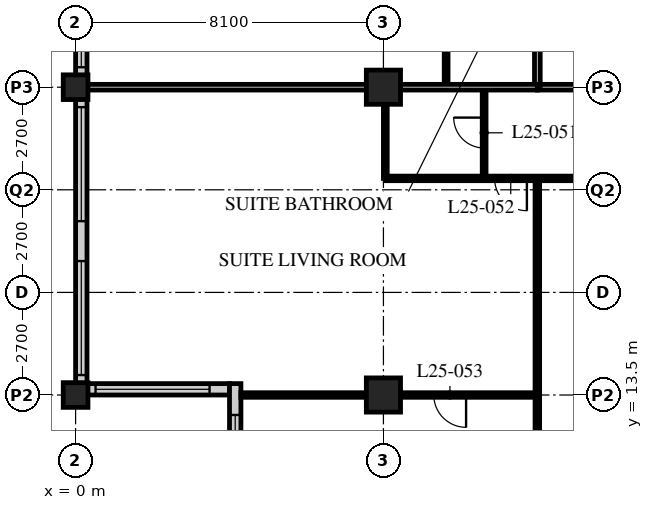
"""IFC4 building model, lengths in metres.
Left out: names, types, materials, properties, quantities, classifications, styles, units other than length and angle.
Written with IfcOpenShell. Run it as: python <this file> out.ifc"""

import sys

from ifc_helpers import new_model, si_unit, direction, frame, frame_2d, origin, origin_2d, place, context, subcontext, project, spatial, rectangle, hollow_rectangle, extrude, element, fill, save


model = new_model("IFC4")
c1 = context("Model", 3, precision=1e-05, world=origin(), true_north=direction((0.0, 1.0)))
c2 = subcontext(c1, "Body", "Model", "MODEL_VIEW")
j1 = project(units=[si_unit("LENGTHUNIT", "METRE"), si_unit("PLANEANGLEUNIT", "RADIAN")], contexts=[c1])
p1 = place(None, origin())
s1 = spatial("IfcSite", under=j1, at=p1, CompositionType="ELEMENT")
p2 = place(p1, origin())
s2 = spatial("IfcBuilding", under=s1, at=p2, CompositionType="ELEMENT")
p3 = place(p2, frame((0.0, 0.0, 103.4)))
s3 = spatial("IfcBuildingStorey", under=s2, at=p3, CompositionType="ELEMENT", Elevation=103.4)
for number, where, z_axis, x_axis in (
    (1, (0.0, 13.5, 0.0), (0.0, 0.0, 1.0), (1.0, 0.0, 0.0)),
    (2, (0.0, 21.6, 0.0), (0.0, 0.0, 1.0), (1.0, 0.0, 0.0)),
):
    element("IfcColumn", number, at=place(p3, frame(where, z_axis=z_axis, x_axis=x_axis)), inside=s3, PredefinedType="COLUMN", context=c2, shape_type="SweptSolid", body=[
        extrude(hollow_rectangle(XDim=0.65, YDim=0.65, WallThickness=0.055, at=origin_2d()), origin(), (0.0, 0.0, 1.0), 3.4),
    ])
for number, where, z_axis, x_axis in (
    (3, (8.1, 13.5, 0.0), (0.0, 0.0, 1.0), (1.0, 0.0, 0.0)),
    (4, (8.1, 21.6, 0.0), (0.0, 0.0, 1.0), (1.0, 0.0, 0.0)),
):
    element("IfcColumn", number, at=place(p3, frame(where, z_axis=z_axis, x_axis=x_axis)), inside=s3, PredefinedType="COLUMN", context=c2, shape_type="SweptSolid", body=[
        extrude(hollow_rectangle(XDim=0.9, YDim=0.9, WallThickness=0.1, at=origin_2d()), origin(), (0.0, 0.0, 1.0), 3.4),
    ])
p4 = place(p3, frame((0.15, 45.6, 0.0), z_axis=(0.0, 0.0, 1.0), x_axis=(0.0, -1.0, 0.0)))
e5 = element("IfcWall", 5, at=p4, inside=s3, PredefinedType="SOLIDWALL", context=c2, shape_type="SweptSolid", body=[
    extrude(rectangle(XDim=32.1, YDim=0.3, at=frame_2d((16.05, 0.0))), origin(), (0.0, 0.0, 1.0), 3.19),
])
p5 = place(p4, frame((0.225, 0.0, 0.9)))
e6 = element("IfcOpeningElement", 6, at=p5, cuts=e5, PredefinedType="OPENING", context=c2, shape_type="SweptSolid", body=[
    extrude(rectangle(XDim=3.0, YDim=2.0, at=frame_2d((1.5, 1.0))), frame((0.0, 0.16, 0.0), z_axis=(0.0, -1.0, 0.0), x_axis=(1.0, 0.0, 0.0)), (0.0, 0.0, 1.0), 0.32),
])
p6 = place(p4, frame((4.275, 0.0, 0.9)))
e7 = element("IfcOpeningElement", 7, at=p6, cuts=e5, PredefinedType="OPENING", context=c2, shape_type="SweptSolid", body=[
    extrude(rectangle(XDim=3.0, YDim=2.0, at=frame_2d((1.5, 1.0))), frame((0.0, 0.16, 0.0), z_axis=(0.0, -1.0, 0.0), x_axis=(1.0, 0.0, 0.0)), (0.0, 0.0, 1.0), 0.32),
])
p7 = place(p4, frame((8.325, 0.0, 0.9)))
e8 = element("IfcOpeningElement", 8, at=p7, cuts=e5, PredefinedType="OPENING", context=c2, shape_type="SweptSolid", body=[
    extrude(rectangle(XDim=3.0, YDim=2.0, at=frame_2d((1.5, 1.0))), frame((0.0, 0.16, 0.0), z_axis=(0.0, -1.0, 0.0), x_axis=(1.0, 0.0, 0.0)), (0.0, 0.0, 1.0), 0.32),
])
p8 = place(p4, frame((12.375, 0.0, 0.9)))
e9 = element("IfcOpeningElement", 9, at=p8, cuts=e5, PredefinedType="OPENING", context=c2, shape_type="SweptSolid", body=[
    extrude(rectangle(XDim=3.0, YDim=2.0, at=frame_2d((1.5, 1.0))), frame((0.0, 0.16, 0.0), z_axis=(0.0, -1.0, 0.0), x_axis=(1.0, 0.0, 0.0)), (0.0, 0.0, 1.0), 0.32),
])
p9 = place(p4, frame((16.425, 0.0, 0.9)))
e10 = element("IfcOpeningElement", 10, at=p9, cuts=e5, PredefinedType="OPENING", context=c2, shape_type="SweptSolid", body=[
    extrude(rectangle(XDim=3.0, YDim=2.0, at=frame_2d((1.5, 1.0))), frame((0.0, 0.16, 0.0), z_axis=(0.0, -1.0, 0.0), x_axis=(1.0, 0.0, 0.0)), (0.0, 0.0, 1.0), 0.32),
])
p10 = place(p4, frame((20.475, 0.0, 0.9)))
e11 = element("IfcOpeningElement", 11, at=p10, cuts=e5, PredefinedType="OPENING", context=c2, shape_type="SweptSolid", body=[
    extrude(rectangle(XDim=3.0, YDim=2.0, at=frame_2d((1.5, 1.0))), frame((0.0, 0.16, 0.0), z_axis=(0.0, -1.0, 0.0), x_axis=(1.0, 0.0, 0.0)), (0.0, 0.0, 1.0), 0.32),
])
p11 = place(p4, frame((24.525, 0.0, 0.9)))
e12 = element("IfcOpeningElement", 12, at=p11, cuts=e5, PredefinedType="OPENING", context=c2, shape_type="SweptSolid", body=[
    extrude(rectangle(XDim=3.0, YDim=2.0, at=frame_2d((1.5, 1.0))), frame((0.0, 0.16, 0.0), z_axis=(0.0, -1.0, 0.0), x_axis=(1.0, 0.0, 0.0)), (0.0, 0.0, 1.0), 0.32),
])
p12 = place(p4, frame((28.575, 0.0, 0.9)))
e13 = element("IfcOpeningElement", 13, at=p12, cuts=e5, PredefinedType="OPENING", context=c2, shape_type="SweptSolid", body=[
    extrude(rectangle(XDim=3.0, YDim=2.0, at=frame_2d((1.5, 1.0))), frame((0.0, 0.16, 0.0), z_axis=(0.0, -1.0, 0.0), x_axis=(1.0, 0.0, 0.0)), (0.0, 0.0, 1.0), 0.32),
])
p13 = place(p3, frame((0.3, 13.65, 0.0), z_axis=(0.0, 0.0, 1.0), x_axis=(1.0, 0.0, 0.0)))
e14 = element("IfcWall", 14, at=p13, inside=s3, PredefinedType="SOLIDWALL", context=c2, shape_type="SweptSolid", body=[
    extrude(rectangle(XDim=3.75, YDim=0.3, at=frame_2d((1.875, 0.0))), origin(), (0.0, 0.0, 1.0), 3.19),
])
p14 = place(p13, frame((0.225, 0.0, 0.9)))
e15 = element("IfcOpeningElement", 15, at=p14, cuts=e14, PredefinedType="OPENING", context=c2, shape_type="SweptSolid", body=[
    extrude(rectangle(XDim=3.0, YDim=1.5, at=frame_2d((1.5, 0.75))), frame((0.0, 0.16, 0.0), z_axis=(0.0, -1.0, 0.0), x_axis=(1.0, 0.0, 0.0)), (0.0, 0.0, 1.0), 0.32),
])
p15 = place(p3, frame((4.2, 13.8, 0.0), z_axis=(0.0, 0.0, 1.0), x_axis=(0.0, -1.0, 0.0)))
e16 = element("IfcWall", 16, at=p15, inside=s3, PredefinedType="SOLIDWALL", context=c2, shape_type="SweptSolid", body=[
    extrude(rectangle(XDim=4.35, YDim=0.3, at=frame_2d((2.175, 0.0))), origin(), (0.0, 0.0, 1.0), 3.19),
])
p16 = place(p15, frame((0.825, 0.0, 0.9)))
e17 = element("IfcOpeningElement", 17, at=p16, cuts=e16, PredefinedType="OPENING", context=c2, shape_type="SweptSolid", body=[
    extrude(rectangle(XDim=3.0, YDim=1.5, at=frame_2d((1.5, 0.75))), frame((0.0, 0.16, 0.0), z_axis=(0.0, -1.0, 0.0), x_axis=(1.0, 0.0, 0.0)), (0.0, 0.0, 1.0), 0.32),
])
p17 = place(p3, frame((12.15, 21.6, 0.0), z_axis=(0.0, 0.0, 1.0), x_axis=(1.0, 0.0, 0.0)))
e18 = element("IfcWall", 18, at=p17, inside=s3, PredefinedType="PARTITIONING", context=c2, shape_type="SweptSolid", body=[
    extrude(rectangle(XDim=32.4, YDim=0.15, at=frame_2d((16.2, 0.0))), origin(), (0.0, 0.0, 1.0), 2.578),
])
p18 = place(p17, frame((5.95, 0.0, 0.0)))
e19 = element("IfcOpeningElement", 19, at=p18, cuts=e18, PredefinedType="OPENING", context=c2, shape_type="SweptSolid", body=[
    extrude(rectangle(XDim=1.0, YDim=2.1, at=frame_2d((0.5, 1.05))), frame((0.0, 0.085, 0.0), z_axis=(0.0, -1.0, 0.0), x_axis=(1.0, 0.0, 0.0)), (0.0, 0.0, 1.0), 0.17),
])
p19 = place(p17, frame((14.05, 0.0, 0.0)))
e20 = element("IfcOpeningElement", 20, at=p19, cuts=e18, PredefinedType="OPENING", context=c2, shape_type="SweptSolid", body=[
    extrude(rectangle(XDim=1.0, YDim=2.1, at=frame_2d((0.5, 1.05))), frame((0.0, 0.085, 0.0), z_axis=(0.0, -1.0, 0.0), x_axis=(1.0, 0.0, 0.0)), (0.0, 0.0, 1.0), 0.17),
])
p20 = place(p17, frame((22.15, 0.0, 0.0)))
e21 = element("IfcOpeningElement", 21, at=p20, cuts=e18, PredefinedType="OPENING", context=c2, shape_type="SweptSolid", body=[
    extrude(rectangle(XDim=1.0, YDim=2.1, at=frame_2d((0.5, 1.05))), frame((0.0, 0.085, 0.0), z_axis=(0.0, -1.0, 0.0), x_axis=(1.0, 0.0, 0.0)), (0.0, 0.0, 1.0), 0.17),
])
p21 = place(p17, frame((1.525, 0.0, 0.0)))
e22 = element("IfcOpeningElement", 22, at=p21, cuts=e18, PredefinedType="OPENING", context=c2, shape_type="SweptSolid", body=[
    extrude(rectangle(XDim=1.0, YDim=2.1, at=frame_2d((0.5, 1.05))), frame((0.0, 0.085, 0.0), z_axis=(0.0, -1.0, 0.0), x_axis=(1.0, 0.0, 0.0)), (0.0, 0.0, 1.0), 0.17),
])
p22 = place(p17, frame((29.875, 0.0, 0.0)))
e23 = element("IfcOpeningElement", 23, at=p22, cuts=e18, PredefinedType="OPENING", context=c2, shape_type="SweptSolid", body=[
    extrude(rectangle(XDim=1.0, YDim=2.1, at=frame_2d((0.5, 1.05))), frame((0.0, 0.085, 0.0), z_axis=(0.0, -1.0, 0.0), x_axis=(1.0, 0.0, 0.0)), (0.0, 0.0, 1.0), 0.17),
])
p23 = place(p3, frame((12.15, 21.6, 0.0), z_axis=(0.0, 0.0, 1.0), x_axis=(0.0, 1.0, 0.0)))
e24 = element("IfcWall", 24, at=p23, inside=s3, PredefinedType="PARTITIONING", context=c2, shape_type="SweptSolid", body=[
    extrude(rectangle(XDim=24.3, YDim=0.15, at=frame_2d((12.15, 0.0))), origin(), (0.0, 0.0, 1.0), 3.19),
])
p24 = place(p23, frame((5.45, 0.0, 0.0)))
e25 = element("IfcOpeningElement", 25, at=p24, cuts=e24, PredefinedType="OPENING", context=c2, shape_type="SweptSolid", body=[
    extrude(rectangle(XDim=1.0, YDim=2.1, at=frame_2d((0.5, 1.05))), frame((0.0, 0.085, 0.0), z_axis=(0.0, -1.0, 0.0), x_axis=(1.0, 0.0, 0.0)), (0.0, 0.0, 1.0), 0.17),
])
p25 = place(p23, frame((13.55, 0.0, 0.0)))
e26 = element("IfcOpeningElement", 26, at=p25, cuts=e24, PredefinedType="OPENING", context=c2, shape_type="SweptSolid", body=[
    extrude(rectangle(XDim=1.0, YDim=2.1, at=frame_2d((0.5, 1.05))), frame((0.0, 0.085, 0.0), z_axis=(0.0, -1.0, 0.0), x_axis=(1.0, 0.0, 0.0)), (0.0, 0.0, 1.0), 0.17),
])
p26 = place(p23, frame((21.65, 0.0, 0.0)))
e27 = element("IfcOpeningElement", 27, at=p26, cuts=e24, PredefinedType="OPENING", context=c2, shape_type="SweptSolid", body=[
    extrude(rectangle(XDim=1.0, YDim=2.1, at=frame_2d((0.5, 1.05))), frame((0.0, 0.085, 0.0), z_axis=(0.0, -1.0, 0.0), x_axis=(1.0, 0.0, 0.0)), (0.0, 0.0, 1.0), 0.17),
])
p27 = place(p3, frame((9.75, 21.6, 0.0), z_axis=(0.0, 0.0, 1.0), x_axis=(0.0, 1.0, 0.0)))
e28 = element("IfcWall", 28, at=p27, inside=s3, PredefinedType="PARTITIONING", context=c2, shape_type="SweptSolid", body=[
    extrude(rectangle(XDim=5.2, YDim=0.1, at=frame_2d((2.6, 0.0))), origin(), (0.0, 0.0, 1.0), 3.19),
])
p28 = place(p27, frame((1.3, 0.0, 0.0)))
e29 = element("IfcOpeningElement", 29, at=p28, cuts=e28, PredefinedType="OPENING", context=c2, shape_type="SweptSolid", body=[
    extrude(rectangle(XDim=0.8, YDim=2.1, at=frame_2d((0.4, 1.05))), frame((0.0, 0.06, 0.0), z_axis=(0.0, -1.0, 0.0), x_axis=(1.0, 0.0, 0.0)), (0.0, 0.0, 1.0), 0.12),
])
p29 = place(p27, frame((3.9, 0.0, 0.0)))
e30 = element("IfcOpeningElement", 30, at=p29, cuts=e28, PredefinedType="OPENING", context=c2, shape_type="SweptSolid", body=[
    extrude(rectangle(XDim=0.8, YDim=2.1, at=frame_2d((0.4, 1.05))), frame((0.0, 0.06, 0.0), z_axis=(0.0, -1.0, 0.0), x_axis=(1.0, 0.0, 0.0)), (0.0, 0.0, 1.0), 0.12),
])
p30 = place(p3, frame((10.75, 21.6, 0.0), z_axis=(0.0, 0.0, 1.0), x_axis=(0.0, -1.0, 0.0)))
e31 = element("IfcWall", 31, at=p30, inside=s3, PredefinedType="PARTITIONING", context=c2, shape_type="SweptSolid", body=[
    extrude(rectangle(XDim=2.4, YDim=0.1, at=frame_2d((1.2, 0.0))), origin(), (0.0, 0.0, 1.0), 3.19),
])
p31 = place(p30, frame((0.8, 0.0, 0.0)))
e32 = element("IfcOpeningElement", 32, at=p31, cuts=e31, PredefinedType="OPENING", context=c2, shape_type="SweptSolid", body=[
    extrude(rectangle(XDim=0.8, YDim=2.1, at=frame_2d((0.4, 1.05))), frame((0.0, 0.06, 0.0), z_axis=(0.0, -1.0, 0.0), x_axis=(1.0, 0.0, 0.0)), (0.0, 0.0, 1.0), 0.12),
])
p32 = place(p3, frame((8.15, 21.6, 0.0), z_axis=(0.0, 0.0, 1.0), x_axis=(0.0, -1.0, 0.0)))
e33 = element("IfcWall", 33, at=p32, inside=s3, PredefinedType="PARTITIONING", context=c2, shape_type="SweptSolid", body=[
    extrude(rectangle(XDim=2.4, YDim=0.1, at=frame_2d((1.2, 0.0))), origin(), (0.0, 0.0, 1.0), 2.578),
])
p33 = place(p3, frame((8.15, 19.2, 0.0), z_axis=(0.0, 0.0, 1.0), x_axis=(1.0, 0.0, 0.0)))
e34 = element("IfcWall", 34, at=p33, inside=s3, PredefinedType="PARTITIONING", context=c2, shape_type="SweptSolid", body=[
    extrude(rectangle(XDim=8.05, YDim=0.12, at=frame_2d((4.025, 0.0))), origin(), (0.0, 0.0, 1.0), 3.19),
])
p34 = place(p33, frame((6.725, 0.0, 0.0)))
e35 = element("IfcOpeningElement", 35, at=p34, cuts=e34, PredefinedType="OPENING", context=c2, shape_type="SweptSolid", body=[
    extrude(rectangle(XDim=0.85, YDim=2.1, at=frame_2d((0.425, 1.05))), frame((0.0, 0.07, 0.0), z_axis=(0.0, -1.0, 0.0), x_axis=(1.0, 0.0, 0.0)), (0.0, 0.0, 1.0), 0.14),
])
p35 = place(p33, frame((2.875, 0.0, 0.0)))
e36 = element("IfcOpeningElement", 36, at=p35, cuts=e34, PredefinedType="OPENING", context=c2, shape_type="SweptSolid", body=[
    extrude(rectangle(XDim=0.85, YDim=2.1, at=frame_2d((0.425, 1.05))), frame((0.0, 0.07, 0.0), z_axis=(0.0, -1.0, 0.0), x_axis=(1.0, 0.0, 0.0)), (0.0, 0.0, 1.0), 0.14),
])
p36 = place(p3, frame((12.15, 19.2, 0.0), z_axis=(0.0, 0.0, 1.0), x_axis=(0.0, -1.0, 0.0)))
e37 = element("IfcWall", 37, at=p36, inside=s3, PredefinedType="PARTITIONING", context=c2, shape_type="SweptSolid", body=[
    extrude(rectangle(XDim=13.5, YDim=0.12, at=frame_2d((6.75, 0.0))), origin(), (0.0, 0.0, 1.0), 3.19),
])
p37 = place(p3, frame((12.15, 13.5, 0.0), z_axis=(0.0, 0.0, 1.0), x_axis=(-1.0, 0.0, 0.0)))
e38 = element("IfcWall", 38, at=p37, inside=s3, PredefinedType="PARTITIONING", context=c2, shape_type="SweptSolid", body=[
    extrude(rectangle(XDim=7.8, YDim=0.12, at=frame_2d((3.9, 0.0))), origin(), (0.0, 0.0, 1.0), 2.578),
])
p38 = place(p37, frame((1.875, 0.0, 0.0)))
e39 = element("IfcOpeningElement", 39, at=p38, cuts=e38, PredefinedType="OPENING", context=c2, shape_type="SweptSolid", body=[
    extrude(rectangle(XDim=0.85, YDim=2.1, at=frame_2d((0.425, 1.05))), frame((0.0, 0.07, 0.0), z_axis=(0.0, -1.0, 0.0), x_axis=(1.0, 0.0, 0.0)), (0.0, 0.0, 1.0), 0.14),
])
p39 = place(p3, frame((0.3, 21.6, 0.0), z_axis=(0.0, 0.0, 1.0), x_axis=(1.0, 0.0, 0.0)))
e40 = element("IfcWall", 40, at=p39, inside=s3, PredefinedType="PARTITIONING", context=c2, shape_type="SweptSolid", body=[
    extrude(rectangle(XDim=11.85, YDim=0.15, at=frame_2d((5.925, 0.0))), origin(), (0.0, 0.0, 1.0), 2.578),
])
p40 = place(p10, origin())
e41 = element("IfcWindow", 41, at=p40, inside=s3, PartitioningType="SINGLE_PANEL", PredefinedType="WINDOW", context=c2, shape_type="SweptSolid", body=[
    extrude(rectangle(XDim=3.0, YDim=2.0, at=frame_2d((1.5, 1.0))), frame((0.0, 0.03, 0.0), z_axis=(0.0, -1.0, 0.0), x_axis=(1.0, 0.0, 0.0)), (0.0, 0.0, 1.0), 0.06),
])
fill(e11, e41)
p41 = place(p11, origin())
e42 = element("IfcWindow", 42, at=p41, inside=s3, PartitioningType="SINGLE_PANEL", PredefinedType="WINDOW", context=c2, shape_type="SweptSolid", body=[
    extrude(rectangle(XDim=3.0, YDim=2.0, at=frame_2d((1.5, 1.0))), frame((0.0, 0.03, 0.0), z_axis=(0.0, -1.0, 0.0), x_axis=(1.0, 0.0, 0.0)), (0.0, 0.0, 1.0), 0.06),
])
fill(e12, e42)
p42 = place(p12, origin())
e43 = element("IfcWindow", 43, at=p42, inside=s3, PartitioningType="SINGLE_PANEL", PredefinedType="WINDOW", context=c2, shape_type="SweptSolid", body=[
    extrude(rectangle(XDim=3.0, YDim=2.0, at=frame_2d((1.5, 1.0))), frame((0.0, 0.03, 0.0), z_axis=(0.0, -1.0, 0.0), x_axis=(1.0, 0.0, 0.0)), (0.0, 0.0, 1.0), 0.06),
])
fill(e13, e43)
p43 = place(p14, origin())
e44 = element("IfcWindow", 44, at=p43, inside=s3, PartitioningType="SINGLE_PANEL", PredefinedType="WINDOW", context=c2, shape_type="SweptSolid", body=[
    extrude(rectangle(XDim=3.0, YDim=1.5, at=frame_2d((1.5, 0.75))), frame((0.0, 0.03, 0.0), z_axis=(0.0, -1.0, 0.0), x_axis=(1.0, 0.0, 0.0)), (0.0, 0.0, 1.0), 0.06),
])
fill(e15, e44)
p44 = place(p16, origin())
e45 = element("IfcWindow", 45, at=p44, inside=s3, PartitioningType="SINGLE_PANEL", PredefinedType="WINDOW", context=c2, shape_type="SweptSolid", body=[
    extrude(rectangle(XDim=3.0, YDim=1.5, at=frame_2d((1.5, 0.75))), frame((0.0, 0.03, 0.0), z_axis=(0.0, -1.0, 0.0), x_axis=(1.0, 0.0, 0.0)), (0.0, 0.0, 1.0), 0.06),
])
fill(e17, e45)
p45 = place(p31, origin())
e46 = element("IfcDoor", 46, at=p45, inside=s3, OperationType="SINGLE_SWING_RIGHT", PredefinedType="DOOR", context=c2, shape_type="SweptSolid", body=[
    extrude(rectangle(XDim=0.8, YDim=2.1, at=frame_2d((0.4, 1.05))), frame((0.0, 0.025, 0.0), z_axis=(0.0, -1.0, 0.0), x_axis=(1.0, 0.0, 0.0)), (0.0, 0.0, 1.0), 0.05),
])
fill(e32, e46)
p46 = place(p35, origin())
e47 = element("IfcDoor", 47, at=p46, inside=s3, OperationType="SINGLE_SWING_LEFT", PredefinedType="DOOR", context=c2, shape_type="SweptSolid", body=[
    extrude(rectangle(XDim=0.85, YDim=2.1, at=frame_2d((0.425, 1.05))), frame((0.0, 0.025, 0.0), z_axis=(0.0, -1.0, 0.0), x_axis=(1.0, 0.0, 0.0)), (0.0, 0.0, 1.0), 0.05),
])
fill(e36, e47)
p47 = place(p38, origin())
e48 = element("IfcDoor", 48, at=p47, inside=s3, OperationType="SINGLE_SWING_LEFT", PredefinedType="DOOR", context=c2, shape_type="SweptSolid", body=[
    extrude(rectangle(XDim=0.85, YDim=2.1, at=frame_2d((0.425, 1.05))), frame((0.0, 0.025, 0.0), z_axis=(0.0, -1.0, 0.0), x_axis=(1.0, 0.0, 0.0)), (0.0, 0.0, 1.0), 0.05),
])
fill(e39, e48)
save(model, sys.argv[1])
